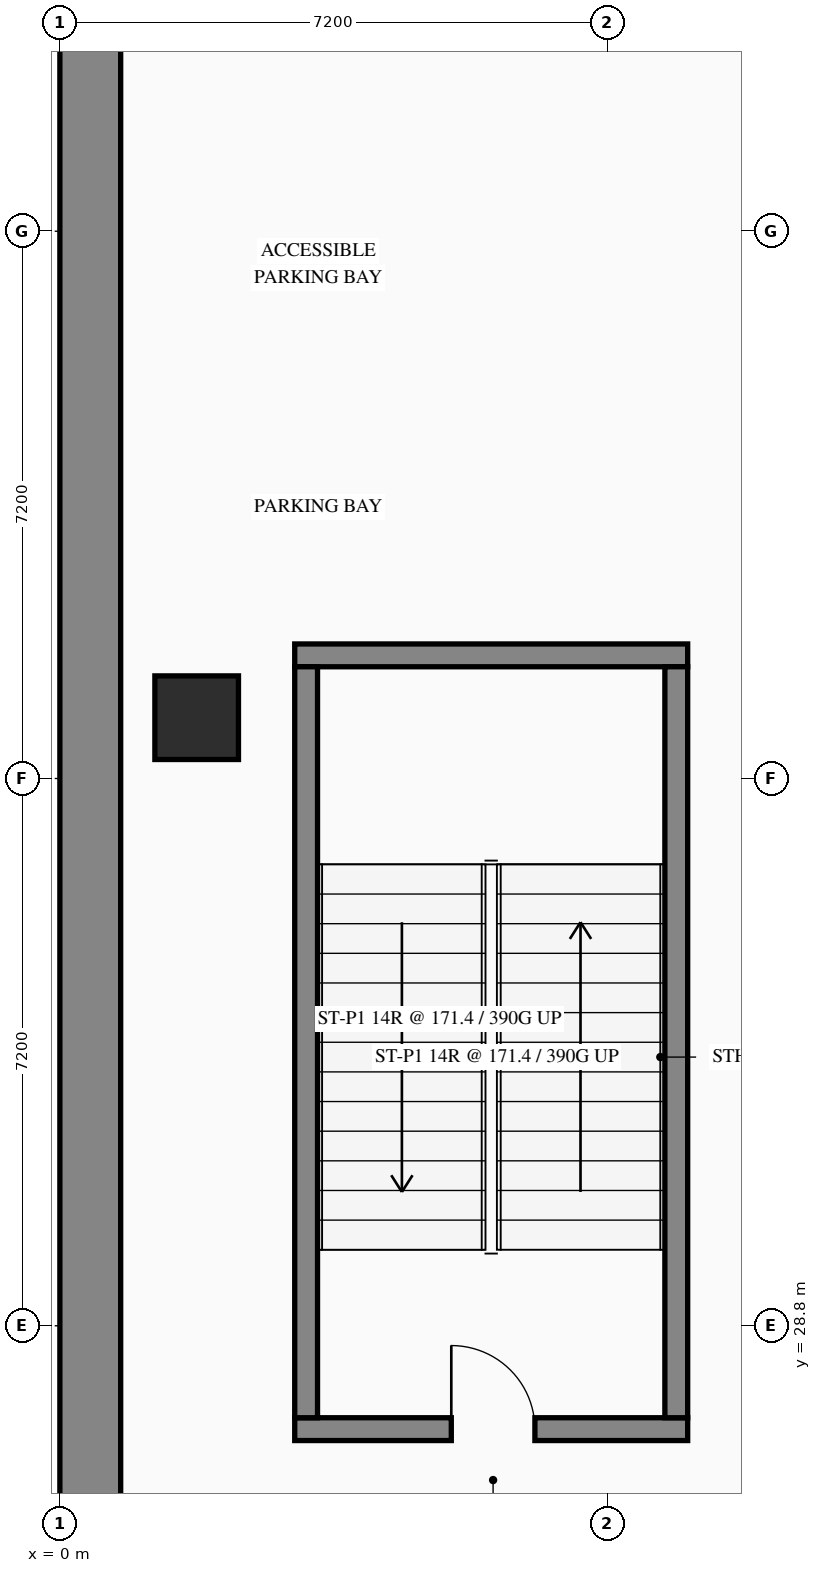
"""IFC4 building model, lengths in metres.
Left out: names, types, materials, properties, quantities, classifications, styles, units other than length and angle.
Written with IfcOpenShell. Run it as: python <this file> out.ifc"""

import sys

from ifc_helpers import new_model, si_unit, direction, frame, frame_2d, origin, origin_2d, place, context, subcontext, project, spatial, rectangle, hollow_rectangle, extrude, element, fill, save


model = new_model("IFC4")
c1 = context("Model", 3, precision=1e-05, world=origin(), true_north=direction((0.0, 1.0)))
c2 = subcontext(c1, "Body", "Model", "MODEL_VIEW")
j1 = project(units=[si_unit("LENGTHUNIT", "METRE"), si_unit("PLANEANGLEUNIT", "RADIAN")], contexts=[c1])
p1 = place(None, origin())
s1 = spatial("IfcSite", under=j1, at=p1, CompositionType="ELEMENT")
p2 = place(p1, origin())
s2 = spatial("IfcBuilding", under=s1, at=p2, CompositionType="ELEMENT")
p3 = place(p2, frame((0.0, 0.0, -9.6)))
s3 = spatial("IfcBuildingStorey", under=s2, at=p3, CompositionType="ELEMENT", Elevation=-9.6)
p4 = place(p3, frame((3.09, 27.44, 0.0), z_axis=(0.0, 0.0, 1.0), x_axis=(1.0, 0.0, 0.0)))
e1 = element("IfcWall", 1, at=p4, inside=s3, PredefinedType="SHEAR", context=c2, shape_type="SweptSolid", body=[
    extrude(rectangle(XDim=5.17, YDim=0.3, at=frame_2d((2.585, 0.0))), origin(), (0.0, 0.0, 1.0), 4.8),
])
p5 = place(p4, frame((2.06, 0.0, 0.0)))
e2 = element("IfcOpeningElement", 2, at=p5, cuts=e1, PredefinedType="OPENING", context=c2, shape_type="SweptSolid", body=[
    extrude(rectangle(XDim=1.1, YDim=2.2, at=frame_2d((0.55, 1.1))), frame((0.0, 0.16, 0.0), z_axis=(0.0, -1.0, 0.0), x_axis=(1.0, 0.0, 0.0)), (0.0, 0.0, 1.0), 0.32),
])
p6 = place(p3, frame((3.09, 37.62, 0.0), z_axis=(0.0, 0.0, 1.0), x_axis=(1.0, 0.0, 0.0)))
e3 = element("IfcWall", 3, at=p6, inside=s3, PredefinedType="SHEAR", context=c2, shape_type="SweptSolid", body=[
    extrude(rectangle(XDim=5.17, YDim=0.3, at=frame_2d((2.585, 0.0))), origin(), (0.0, 0.0, 1.0), 4.8),
])
for number, where, z_axis, x_axis in (
    (4, (3.24, 27.59, 0.0), (0.0, 0.0, 1.0), (0.0, 1.0, 0.0)),
    (5, (8.11, 27.59, 0.0), (0.0, 0.0, 1.0), (0.0, 1.0, 0.0)),
):
    element("IfcWall", number, at=place(p3, frame(where, z_axis=z_axis, x_axis=x_axis)), inside=s3, PredefinedType="SHEAR", context=c2, shape_type="SweptSolid", body=[
        extrude(rectangle(XDim=9.88, YDim=0.3, at=frame_2d((4.94, 0.0))), origin(), (0.0, 0.0, 1.0), 4.8),
    ])
p7 = place(p3, frame((0.4, 25.966, 0.0), z_axis=(0.0, 0.0, 1.0), x_axis=(0.0, 1.0, 0.0)))
e6 = element("IfcWall", 6, at=p7, inside=s3, PredefinedType="SHEAR", context=c2, shape_type="SweptSolid", body=[
    extrude(rectangle(XDim=23.068, YDim=0.8, at=frame_2d((11.534, 0.0))), origin(), (0.0, 0.0, 1.0), 4.5),
])
p8 = place(p3, frame((1.8, 36.8, 0.0), z_axis=(0.0, 0.0, 1.0), x_axis=(1.0, 0.0, 0.0)))
e7 = element("IfcColumn", 7, at=p8, inside=s3, PredefinedType="COLUMN", context=c2, shape_type="SweptSolid", body=[
    extrude(hollow_rectangle(XDim=1.1, YDim=1.1, WallThickness=0.04, at=origin_2d()), origin(), (0.0, 0.0, 1.0), 4.8),
])
p9 = place(p5, origin())
e8 = element("IfcDoor", 8, at=p9, inside=s3, OperationType="SINGLE_SWING_LEFT", PredefinedType="DOOR", context=c2, shape_type="SweptSolid", body=[
    extrude(rectangle(XDim=1.1, YDim=2.2, at=frame_2d((0.55, 1.1))), frame((0.0, 0.025, 0.0), z_axis=(0.0, -1.0, 0.0), x_axis=(1.0, 0.0, 0.0)), (0.0, 0.0, 1.0), 0.05),
])
fill(e2, e8)
save(model, sys.argv[1])
